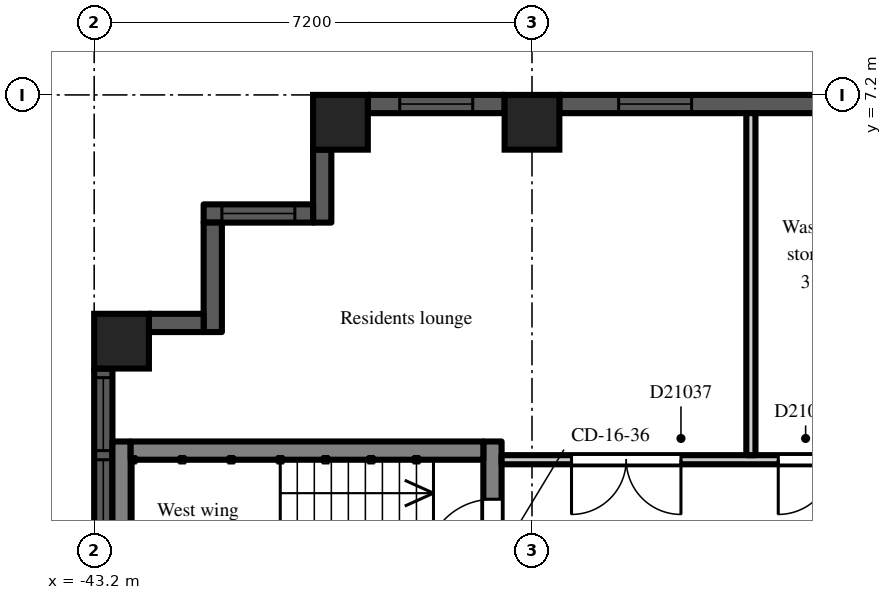
"""IFC4 building model, lengths in metres.
Left out: names, types, materials, properties, quantities, classifications, styles, units other than length and angle.
Written with IfcOpenShell. Run it as: python <this file> out.ifc"""

import sys

from ifc_helpers import new_model, si_unit, direction, frame, frame_2d, origin, origin_2d, place, context, subcontext, project, spatial, rectangle, extrude, element, fill, save


model = new_model("IFC4")
c1 = context("Model", 3, precision=1e-05, world=origin(), true_north=direction((0.0, 1.0)))
c2 = subcontext(c1, "Body", "Model", "MODEL_VIEW")
j1 = project(units=[si_unit("LENGTHUNIT", "METRE"), si_unit("PLANEANGLEUNIT", "RADIAN")], contexts=[c1])
p1 = place(None, origin())
s1 = spatial("IfcSite", under=j1, at=p1, CompositionType="ELEMENT")
p2 = place(p1, origin())
s2 = spatial("IfcBuilding", under=s1, at=p2, CompositionType="ELEMENT")
p3 = place(p2, frame((0.0, 0.0, 147.3)))
s3 = spatial("IfcBuildingStorey", under=s2, at=p3, CompositionType="ELEMENT", Elevation=147.3)
for number, where, z_axis, x_axis in (
    (1, (-42.75, 3.15, 0.0), (0.0, 0.0, 1.0), (1.0, 0.0, 0.0)),
    (2, (-39.15, 6.75, 0.0), (0.0, 0.0, 1.0), (1.0, 0.0, 0.0)),
    (3, (-36.0, 6.75, 0.0), (0.0, 0.0, 1.0), (1.0, 0.0, 0.0)),
):
    element("IfcColumn", number, at=place(p3, frame(where, z_axis=z_axis, x_axis=x_axis)), inside=s3, PredefinedType="COLUMN", context=c2, shape_type="SweptSolid", body=[
        extrude(rectangle(XDim=0.9, YDim=0.9, at=origin_2d()), origin(), (0.0, 0.0, 1.0), 3.0),
    ])
p4 = place(p3, frame((-29.25, 7.05, 0.0), z_axis=(0.0, 0.0, 1.0), x_axis=(-1.0, 0.0, 0.0)))
e4 = element("IfcWall", 4, at=p4, inside=s3, PredefinedType="SOLIDWALL", context=c2, shape_type="SweptSolid", body=[
    extrude(rectangle(XDim=6.3, YDim=0.3, at=frame_2d((3.15, 0.0))), origin(), (0.0, 0.0, 1.0), 2.2),
])
p5 = place(p4, frame((4.125, 0.0, 0.2)))
e5 = element("IfcOpeningElement", 5, at=p5, cuts=e4, PredefinedType="OPENING", context=c2, shape_type="SweptSolid", body=[
    extrude(rectangle(XDim=1.2, YDim=1.85, at=frame_2d((0.6, 0.925))), frame((0.0, 0.16, 0.0), z_axis=(0.0, -1.0, 0.0), x_axis=(1.0, 0.0, 0.0)), (0.0, 0.0, 1.0), 0.32),
])
p6 = place(p3, frame((-36.45, 7.05, 0.0), z_axis=(0.0, 0.0, 1.0), x_axis=(-1.0, 0.0, 0.0)))
e6 = element("IfcWall", 6, at=p6, inside=s3, PredefinedType="SOLIDWALL", context=c2, shape_type="SweptSolid", body=[
    extrude(rectangle(XDim=2.25, YDim=0.3, at=frame_2d((1.125, 0.0))), origin(), (0.0, 0.0, 1.0), 2.2),
])
p7 = place(p6, frame((0.525, 0.0, 0.2)))
e7 = element("IfcOpeningElement", 7, at=p7, cuts=e6, PredefinedType="OPENING", context=c2, shape_type="SweptSolid", body=[
    extrude(rectangle(XDim=1.2, YDim=1.85, at=frame_2d((0.6, 0.925))), frame((0.0, 0.16, 0.0), z_axis=(0.0, -1.0, 0.0), x_axis=(1.0, 0.0, 0.0)), (0.0, 0.0, 1.0), 0.32),
])
p8 = place(p3, frame((-39.45, 6.3, 0.0), z_axis=(0.0, 0.0, 1.0), x_axis=(0.0, -1.0, 0.0)))
e8 = element("IfcWall", 8, at=p8, inside=s3, PredefinedType="SOLIDWALL", context=c2, shape_type="SweptSolid", body=[
    extrude(rectangle(XDim=1.2, YDim=0.3, at=frame_2d((0.6, 0.0))), origin(), (0.0, 0.0, 1.0), 2.6),
])
p9 = place(p3, frame((-39.6, 5.25, 0.0), z_axis=(0.0, 0.0, 1.0), x_axis=(-1.0, 0.0, 0.0)))
e9 = element("IfcWall", 9, at=p9, inside=s3, PredefinedType="SOLIDWALL", context=c2, shape_type="SweptSolid", body=[
    extrude(rectangle(XDim=1.8, YDim=0.3, at=frame_2d((0.9, 0.0))), origin(), (0.0, 0.0, 1.0), 2.6),
])
p10 = place(p9, frame((0.3, 0.0, 0.2)))
e10 = element("IfcOpeningElement", 10, at=p10, cuts=e9, PredefinedType="OPENING", context=c2, shape_type="SweptSolid", body=[
    extrude(rectangle(XDim=1.2, YDim=1.85, at=frame_2d((0.6, 0.925))), frame((0.0, 0.16, 0.0), z_axis=(0.0, -1.0, 0.0), x_axis=(1.0, 0.0, 0.0)), (0.0, 0.0, 1.0), 0.32),
])
p11 = place(p3, frame((-41.25, 5.1, 0.0), z_axis=(0.0, 0.0, 1.0), x_axis=(0.0, -1.0, 0.0)))
e11 = element("IfcWall", 11, at=p11, inside=s3, PredefinedType="SOLIDWALL", context=c2, shape_type="SweptSolid", body=[
    extrude(rectangle(XDim=1.8, YDim=0.3, at=frame_2d((0.9, 0.0))), origin(), (0.0, 0.0, 1.0), 2.6),
])
p12 = place(p3, frame((-41.4, 3.45, 0.0), z_axis=(0.0, 0.0, 1.0), x_axis=(-1.0, 0.0, 0.0)))
e12 = element("IfcWall", 12, at=p12, inside=s3, PredefinedType="SOLIDWALL", context=c2, shape_type="SweptSolid", body=[
    extrude(rectangle(XDim=0.9, YDim=0.3, at=frame_2d((0.45, 0.0))), origin(), (0.0, 0.0, 1.0), 2.6),
])
p13 = place(p3, frame((-43.05, 2.7, 0.0), z_axis=(0.0, 0.0, 1.0), x_axis=(0.0, -1.0, 0.0)))
e13 = element("IfcWall", 13, at=p13, inside=s3, PredefinedType="SOLIDWALL", context=c2, shape_type="SweptSolid", body=[
    extrude(rectangle(XDim=5.4, YDim=0.3, at=frame_2d((2.7, 0.0))), origin(), (0.0, 0.0, 1.0), 2.2),
])
p14 = place(p13, frame((1.5, 0.0, 0.2)))
e14 = element("IfcOpeningElement", 14, at=p14, cuts=e13, PredefinedType="OPENING", context=c2, shape_type="SweptSolid", body=[
    extrude(rectangle(XDim=2.4, YDim=1.85, at=frame_2d((1.2, 0.925))), frame((0.0, 0.16, 0.0), z_axis=(0.0, -1.0, 0.0), x_axis=(1.0, 0.0, 0.0)), (0.0, 0.0, 1.0), 0.32),
])
p15 = place(p13, frame((0.15, 0.0, 0.2)))
e15 = element("IfcOpeningElement", 15, at=p15, cuts=e13, PredefinedType="OPENING", context=c2, shape_type="SweptSolid", body=[
    extrude(rectangle(XDim=1.2, YDim=1.85, at=frame_2d((0.6, 0.925))), frame((0.0, 0.16, 0.0), z_axis=(0.0, -1.0, 0.0), x_axis=(1.0, 0.0, 0.0)), (0.0, 0.0, 1.0), 0.32),
])
p16 = place(p13, frame((4.05, 0.0, 0.2)))
e16 = element("IfcOpeningElement", 16, at=p16, cuts=e13, PredefinedType="OPENING", context=c2, shape_type="SweptSolid", body=[
    extrude(rectangle(XDim=1.2, YDim=1.85, at=frame_2d((0.6, 0.925))), frame((0.0, 0.16, 0.0), z_axis=(0.0, -1.0, 0.0), x_axis=(1.0, 0.0, 0.0)), (0.0, 0.0, 1.0), 0.32),
])
p17 = place(p3, frame((-36.65, -1.5, 0.0), z_axis=(0.0, 0.0, 1.0), x_axis=(0.0, 1.0, 0.0)))
e17 = element("IfcWall", 17, at=p17, inside=s3, PredefinedType="SHEAR", context=c2, shape_type="SweptSolid", body=[
    extrude(rectangle(XDim=3.0, YDim=0.3, at=frame_2d((1.5, 0.0))), origin(), (0.0, 0.0, 1.0), 2.6),
])
p18 = place(p17, frame((0.95, 0.0, 0.0)))
e18 = element("IfcOpeningElement", 18, at=p18, cuts=e17, PredefinedType="OPENING", context=c2, shape_type="SweptSolid", body=[
    extrude(rectangle(XDim=1.1, YDim=2.1, at=frame_2d((0.55, 1.05))), frame((0.0, 0.16, 0.0), z_axis=(0.0, -1.0, 0.0), x_axis=(1.0, 0.0, 0.0)), (0.0, 0.0, 1.0), 0.32),
])
p19 = place(p3, frame((-42.75, -1.5, 0.0), z_axis=(0.0, 0.0, 1.0), x_axis=(0.0, 1.0, 0.0)))
e19 = element("IfcWall", 19, at=p19, inside=s3, PredefinedType="SHEAR", context=c2, shape_type="SweptSolid", body=[
    extrude(rectangle(XDim=3.0, YDim=0.3, at=frame_2d((1.5, 0.0))), origin(), (0.0, 0.0, 1.0), 2.6),
])
p20 = place(p3, frame((-36.8, 1.35, 0.0), z_axis=(0.0, 0.0, 1.0), x_axis=(-1.0, 0.0, 0.0)))
e20 = element("IfcWall", 20, at=p20, inside=s3, PredefinedType="SHEAR", context=c2, shape_type="SweptSolid", body=[
    extrude(rectangle(XDim=5.8, YDim=0.3, at=frame_2d((2.9, 0.0))), origin(), (0.0, 0.0, 1.0), 2.6),
])
p21 = place(p3, frame((-36.5, 1.2, 0.0), z_axis=(0.0, 0.0, 1.0), x_axis=(1.0, 0.0, 0.0)))
e21 = element("IfcWall", 21, at=p21, inside=s3, PredefinedType="PARTITIONING", context=c2, shape_type="SweptSolid", body=[
    extrude(rectangle(XDim=14.9, YDim=0.15, at=frame_2d((7.45, 0.0))), origin(), (0.0, 0.0, 1.0), 2.6),
])
p22 = place(p21, frame((13.55, 0.0, 0.0)))
e22 = element("IfcOpeningElement", 22, at=p22, cuts=e21, PredefinedType="OPENING", context=c2, shape_type="SweptSolid", body=[
    extrude(rectangle(XDim=0.9, YDim=2.1, at=frame_2d((0.45, 1.05))), frame((0.0, 0.085, 0.0), z_axis=(0.0, -1.0, 0.0), x_axis=(1.0, 0.0, 0.0)), (0.0, 0.0, 1.0), 0.17),
])
p23 = place(p21, frame((11.75, 0.0, 0.0)))
e23 = element("IfcOpeningElement", 23, at=p23, cuts=e21, PredefinedType="OPENING", context=c2, shape_type="SweptSolid", body=[
    extrude(rectangle(XDim=0.9, YDim=2.1, at=frame_2d((0.45, 1.05))), frame((0.0, 0.085, 0.0), z_axis=(0.0, -1.0, 0.0), x_axis=(1.0, 0.0, 0.0)), (0.0, 0.0, 1.0), 0.17),
])
p24 = place(p21, frame((8.3, 0.0, 0.0)))
e24 = element("IfcOpeningElement", 24, at=p24, cuts=e21, PredefinedType="OPENING", context=c2, shape_type="SweptSolid", body=[
    extrude(rectangle(XDim=1.0, YDim=2.1, at=frame_2d((0.5, 1.05))), frame((0.0, 0.085, 0.0), z_axis=(0.0, -1.0, 0.0), x_axis=(1.0, 0.0, 0.0)), (0.0, 0.0, 1.0), 0.17),
])
p25 = place(p21, frame((6.35, 0.0, 0.0)))
e25 = element("IfcOpeningElement", 25, at=p25, cuts=e21, PredefinedType="OPENING", context=c2, shape_type="SweptSolid", body=[
    extrude(rectangle(XDim=0.9, YDim=2.1, at=frame_2d((0.45, 1.05))), frame((0.0, 0.085, 0.0), z_axis=(0.0, -1.0, 0.0), x_axis=(1.0, 0.0, 0.0)), (0.0, 0.0, 1.0), 0.17),
])
p26 = place(p21, frame((4.55, 0.0, 0.0)))
e26 = element("IfcOpeningElement", 26, at=p26, cuts=e21, PredefinedType="OPENING", context=c2, shape_type="SweptSolid", body=[
    extrude(rectangle(XDim=0.9, YDim=2.1, at=frame_2d((0.45, 1.05))), frame((0.0, 0.085, 0.0), z_axis=(0.0, -1.0, 0.0), x_axis=(1.0, 0.0, 0.0)), (0.0, 0.0, 1.0), 0.17),
])
p27 = place(p21, frame((1.15, 0.0, 0.0)))
e27 = element("IfcOpeningElement", 27, at=p27, cuts=e21, PredefinedType="OPENING", context=c2, shape_type="SweptSolid", body=[
    extrude(rectangle(XDim=1.8, YDim=2.1, at=frame_2d((0.9, 1.05))), frame((0.0, 0.085, 0.0), z_axis=(0.0, -1.0, 0.0), x_axis=(1.0, 0.0, 0.0)), (0.0, 0.0, 1.0), 0.17),
])
p28 = place(p3, frame((-32.4, 1.275, 0.0), z_axis=(0.0, 0.0, 1.0), x_axis=(0.0, 1.0, 0.0)))
e28 = element("IfcWall", 28, at=p28, inside=s3, PredefinedType="PARTITIONING", context=c2, shape_type="SweptSolid", body=[
    extrude(rectangle(XDim=5.625, YDim=0.15, at=frame_2d((2.812, 0.0))), origin(), (0.0, 0.0, 1.0), 2.6),
])
p29 = place(p5, origin())
e29 = element("IfcWindow", 29, at=p29, inside=s3, PartitioningType="SINGLE_PANEL", PredefinedType="WINDOW", context=c2, shape_type="SweptSolid", body=[
    extrude(rectangle(XDim=1.2, YDim=1.85, at=frame_2d((0.6, 0.925))), frame((0.0, 0.03, 0.0), z_axis=(0.0, -1.0, 0.0), x_axis=(1.0, 0.0, 0.0)), (0.0, 0.0, 1.0), 0.06),
])
fill(e5, e29)
p30 = place(p7, origin())
e30 = element("IfcWindow", 30, at=p30, inside=s3, PartitioningType="SINGLE_PANEL", PredefinedType="WINDOW", context=c2, shape_type="SweptSolid", body=[
    extrude(rectangle(XDim=1.2, YDim=1.85, at=frame_2d((0.6, 0.925))), frame((0.0, 0.03, 0.0), z_axis=(0.0, -1.0, 0.0), x_axis=(1.0, 0.0, 0.0)), (0.0, 0.0, 1.0), 0.06),
])
fill(e7, e30)
p31 = place(p10, origin())
e31 = element("IfcWindow", 31, at=p31, inside=s3, PartitioningType="SINGLE_PANEL", PredefinedType="WINDOW", context=c2, shape_type="SweptSolid", body=[
    extrude(rectangle(XDim=1.2, YDim=1.85, at=frame_2d((0.6, 0.925))), frame((0.0, 0.03, 0.0), z_axis=(0.0, -1.0, 0.0), x_axis=(1.0, 0.0, 0.0)), (0.0, 0.0, 1.0), 0.06),
])
fill(e10, e31)
p32 = place(p14, origin())
e32 = element("IfcWindow", 32, at=p32, inside=s3, PartitioningType="SINGLE_PANEL", PredefinedType="WINDOW", context=c2, shape_type="SweptSolid", body=[
    extrude(rectangle(XDim=2.4, YDim=1.85, at=frame_2d((1.2, 0.925))), frame((0.0, 0.03, 0.0), z_axis=(0.0, -1.0, 0.0), x_axis=(1.0, 0.0, 0.0)), (0.0, 0.0, 1.0), 0.06),
])
fill(e14, e32)
p33 = place(p15, origin())
e33 = element("IfcWindow", 33, at=p33, inside=s3, PartitioningType="SINGLE_PANEL", PredefinedType="WINDOW", context=c2, shape_type="SweptSolid", body=[
    extrude(rectangle(XDim=1.2, YDim=1.85, at=frame_2d((0.6, 0.925))), frame((0.0, 0.03, 0.0), z_axis=(0.0, -1.0, 0.0), x_axis=(1.0, 0.0, 0.0)), (0.0, 0.0, 1.0), 0.06),
])
fill(e15, e33)
p34 = place(p18, origin())
e34 = element("IfcDoor", 34, at=p34, inside=s3, OperationType="SINGLE_SWING_LEFT", PredefinedType="DOOR", context=c2, shape_type="SweptSolid", body=[
    extrude(rectangle(XDim=1.1, YDim=2.1, at=frame_2d((0.55, 1.05))), frame((0.0, 0.025, 0.0), z_axis=(0.0, -1.0, 0.0), x_axis=(1.0, 0.0, 0.0)), (0.0, 0.0, 1.0), 0.05),
])
fill(e18, e34)
p35 = place(p26, frame((0.9, 0.0, 0.0), z_axis=(0.0, 0.0, 1.0), x_axis=(-1.0, 0.0, 0.0)))
e35 = element("IfcDoor", 35, at=p35, inside=s3, OperationType="SINGLE_SWING_RIGHT", PredefinedType="DOOR", context=c2, shape_type="SweptSolid", body=[
    extrude(rectangle(XDim=0.9, YDim=2.1, at=frame_2d((0.45, 1.05))), frame((0.0, 0.025, 0.0), z_axis=(0.0, -1.0, 0.0), x_axis=(1.0, 0.0, 0.0)), (0.0, 0.0, 1.0), 0.05),
])
fill(e26, e35)
p36 = place(p27, frame((1.8, 0.0, 0.0), z_axis=(0.0, 0.0, 1.0), x_axis=(-1.0, 0.0, 0.0)))
e36 = element("IfcDoor", 36, at=p36, inside=s3, OperationType="DOUBLE_DOOR_DOUBLE_SWING", PredefinedType="DOOR", context=c2, shape_type="SweptSolid", body=[
    extrude(rectangle(XDim=1.8, YDim=2.1, at=frame_2d((0.9, 1.05))), frame((0.0, 0.025, 0.0), z_axis=(0.0, -1.0, 0.0), x_axis=(1.0, 0.0, 0.0)), (0.0, 0.0, 1.0), 0.05),
])
fill(e27, e36)
save(model, sys.argv[1])
